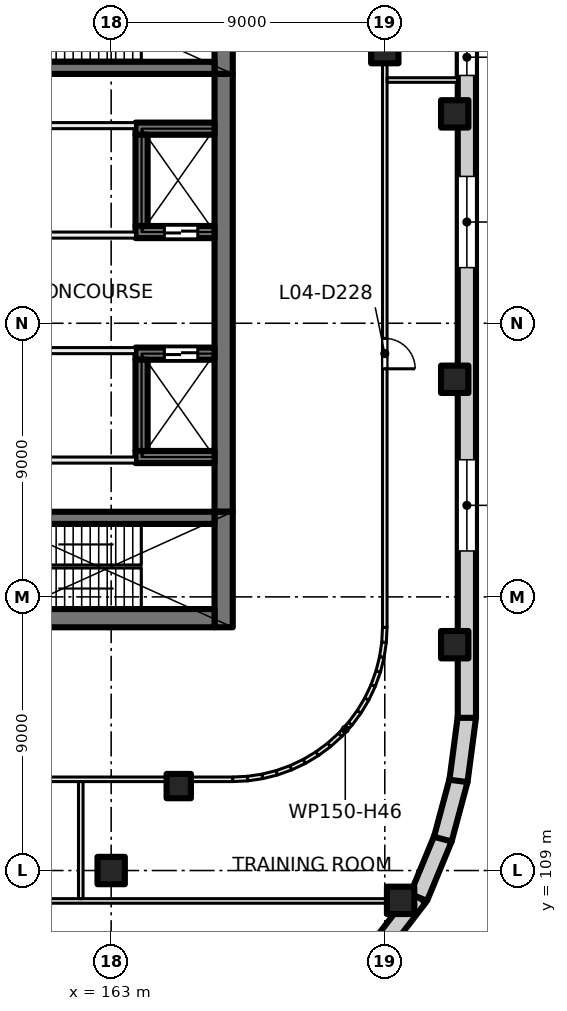
"""IFC4 building model, lengths in metres.
Left out: names, types, materials, properties, quantities, classifications, styles, units other than length and angle.
Written with IfcOpenShell. Run it as: python <this file> out.ifc"""

import sys

from ifc_helpers import new_model, si_unit, direction, frame, frame_2d, origin, origin_2d, place, context, subcontext, project, spatial, rectangle, extrude, element, fill, save


model = new_model("IFC4")
c1 = context("Model", 3, precision=1e-05, world=origin(), true_north=direction((0.0, 1.0)))
c2 = subcontext(c1, "Body", "Model", "MODEL_VIEW")
j1 = project(units=[si_unit("LENGTHUNIT", "METRE"), si_unit("PLANEANGLEUNIT", "RADIAN")], contexts=[c1])
p1 = place(None, origin())
s1 = spatial("IfcSite", under=j1, at=p1, CompositionType="ELEMENT")
p2 = place(p1, origin())
s2 = spatial("IfcBuilding", under=s1, at=p2, CompositionType="ELEMENT")
p3 = place(p2, frame((0.0, 0.0, 22.5)))
s3 = spatial("IfcBuildingStorey", under=s2, at=p3, CompositionType="ELEMENT", Elevation=22.5)
for number, where, z_axis, x_axis in (
    (1, (163.0, 109.0, 0.0), (0.0, 0.0, 1.0), (1.0, 0.0, 0.0)),
    (2, (172.0, 136.0, 0.0), (0.0, 0.0, 1.0), (1.0, 0.0, 0.0)),
    (3, (174.3, 133.887, 0.0), (0.0, 0.0, 1.0), (1.0, 0.0, 0.0)),
    (4, (174.3, 125.157, 0.0), (0.0, 0.0, 1.0), (1.0, 0.0, 0.0)),
    (5, (174.3, 116.427, 0.0), (0.0, 0.0, 1.0), (1.0, 0.0, 0.0)),
    (6, (172.521, 108.019, 0.0), (0.0, 0.0, 1.0), (1.0, 0.0, 0.0)),
):
    element("IfcColumn", number, at=place(p3, frame(where, z_axis=z_axis, x_axis=x_axis)), inside=s3, PredefinedType="COLUMN", context=c2, shape_type="SweptSolid", body=[
        extrude(rectangle(XDim=0.9, YDim=0.9, at=origin_2d()), origin(), (0.0, 0.0, 1.0), 5.0),
    ])
p4 = place(p3, frame((165.223, 111.777, 0.0), z_axis=(0.0, 0.0, 1.0), x_axis=(1.0, 0.0, 0.0)))
e7 = element("IfcColumn", 7, at=p4, inside=s3, PredefinedType="COLUMN", context=c2, shape_type="SweptSolid", body=[
    extrude(rectangle(XDim=0.8, YDim=0.8, at=origin_2d()), origin(), (0.0, 0.0, 1.0), 5.0),
])
p5 = place(p3, frame((166.7, 139.0, 0.0), z_axis=(0.0, 0.0, 1.0), x_axis=(0.0, -1.0, 0.0)))
e8 = element("IfcWall", 8, at=p5, inside=s3, PredefinedType="SHEAR", context=c2, shape_type="SweptSolid", body=[
    extrude(rectangle(XDim=3.8, YDim=0.6, at=frame_2d((1.9, 0.0))), origin(), (0.0, 0.0, 1.0), 5.0),
])
p6 = place(p3, frame((166.7, 135.2, 0.0), z_axis=(0.0, 0.0, 1.0), x_axis=(0.0, -1.0, 0.0)))
e9 = element("IfcWall", 9, at=p6, inside=s3, PredefinedType="SHEAR", context=c2, shape_type="SweptSolid", body=[
    extrude(rectangle(XDim=14.4, YDim=0.6, at=frame_2d((7.2, 0.0))), origin(), (0.0, 0.0, 1.0), 5.0),
])
p7 = place(p3, frame((166.7, 120.8, 0.0), z_axis=(0.0, 0.0, 1.0), x_axis=(0.0, -1.0, 0.0)))
e10 = element("IfcWall", 10, at=p7, inside=s3, PredefinedType="SHEAR", context=c2, shape_type="SweptSolid", body=[
    extrude(rectangle(XDim=3.8, YDim=0.6, at=frame_2d((1.9, 0.0))), origin(), (0.0, 0.0, 1.0), 5.0),
])
p8 = place(p3, frame((166.4, 117.3, 0.0), z_axis=(0.0, 0.0, 1.0), x_axis=(-1.0, 0.0, 0.0)))
e11 = element("IfcWall", 11, at=p8, inside=s3, PredefinedType="SHEAR", context=c2, shape_type="SweptSolid", body=[
    extrude(rectangle(XDim=7.8, YDim=0.6, at=frame_2d((3.9, 0.0))), origin(), (0.0, 0.0, 1.0), 5.0),
])
for number, where, z_axis, x_axis in (
    (12, (166.4, 135.4, 0.0), (0.0, 0.0, 1.0), (-1.0, 0.0, 0.0)),
    (13, (166.4, 120.6, 0.0), (0.0, 0.0, 1.0), (-1.0, 0.0, 0.0)),
):
    element("IfcWall", number, at=place(p3, frame(where, z_axis=z_axis, x_axis=x_axis)), inside=s3, PredefinedType="SHEAR", context=c2, shape_type="SweptSolid", body=[
        extrude(rectangle(XDim=7.8, YDim=0.4, at=frame_2d((3.9, 0.0))), origin(), (0.0, 0.0, 1.0), 5.0),
    ])
p9 = place(p3, frame((166.4, 130.0, 0.0), z_axis=(0.0, 0.0, 1.0), x_axis=(-1.0, 0.0, 0.0)))
e14 = element("IfcWall", 14, at=p9, inside=s3, PredefinedType="SHEAR", context=c2, shape_type="SweptSolid", body=[
    extrude(rectangle(XDim=2.6, YDim=0.4, at=frame_2d((1.3, 0.0))), origin(), (0.0, 0.0, 1.0), 5.0),
])
p10 = place(p9, frame((0.55, 0.0, 0.0)))
e15 = element("IfcOpeningElement", 15, at=p10, cuts=e14, PredefinedType="OPENING", context=c2, shape_type="SweptSolid", body=[
    extrude(rectangle(XDim=1.1, YDim=2.1, at=frame_2d((0.55, 1.05))), frame((0.0, 0.21, 0.0), z_axis=(0.0, -1.0, 0.0), x_axis=(1.0, 0.0, 0.0)), (0.0, 0.0, 1.0), 0.42),
])
p11 = place(p3, frame((166.4, 133.4, 0.0), z_axis=(0.0, 0.0, 1.0), x_axis=(-1.0, 0.0, 0.0)))
e16 = element("IfcWall", 16, at=p11, inside=s3, PredefinedType="SHEAR", context=c2, shape_type="SweptSolid", body=[
    extrude(rectangle(XDim=2.6, YDim=0.4, at=frame_2d((1.3, 0.0))), origin(), (0.0, 0.0, 1.0), 5.0),
])
p12 = place(p3, frame((164.0, 133.2, 0.0), z_axis=(0.0, 0.0, 1.0), x_axis=(0.0, -1.0, 0.0)))
e17 = element("IfcWall", 17, at=p12, inside=s3, PredefinedType="SHEAR", context=c2, shape_type="SweptSolid", body=[
    extrude(rectangle(XDim=3.0, YDim=0.4, at=frame_2d((1.5, 0.0))), origin(), (0.0, 0.0, 1.0), 5.0),
])
p13 = place(p3, frame((166.4, 126.0, 0.0), z_axis=(0.0, 0.0, 1.0), x_axis=(-1.0, 0.0, 0.0)))
e18 = element("IfcWall", 18, at=p13, inside=s3, PredefinedType="SHEAR", context=c2, shape_type="SweptSolid", body=[
    extrude(rectangle(XDim=2.6, YDim=0.4, at=frame_2d((1.3, 0.0))), origin(), (0.0, 0.0, 1.0), 5.0),
])
p14 = place(p13, frame((0.55, 0.0, 0.0)))
e19 = element("IfcOpeningElement", 19, at=p14, cuts=e18, PredefinedType="OPENING", context=c2, shape_type="SweptSolid", body=[
    extrude(rectangle(XDim=1.1, YDim=2.1, at=frame_2d((0.55, 1.05))), frame((0.0, 0.21, 0.0), z_axis=(0.0, -1.0, 0.0), x_axis=(1.0, 0.0, 0.0)), (0.0, 0.0, 1.0), 0.42),
])
p15 = place(p3, frame((166.4, 122.6, 0.0), z_axis=(0.0, 0.0, 1.0), x_axis=(-1.0, 0.0, 0.0)))
e20 = element("IfcWall", 20, at=p15, inside=s3, PredefinedType="SHEAR", context=c2, shape_type="SweptSolid", body=[
    extrude(rectangle(XDim=2.6, YDim=0.4, at=frame_2d((1.3, 0.0))), origin(), (0.0, 0.0, 1.0), 5.0),
])
p16 = place(p3, frame((164.0, 125.8, 0.0), z_axis=(0.0, 0.0, 1.0), x_axis=(0.0, -1.0, 0.0)))
e21 = element("IfcWall", 21, at=p16, inside=s3, PredefinedType="SHEAR", context=c2, shape_type="SweptSolid", body=[
    extrude(rectangle(XDim=3.0, YDim=0.4, at=frame_2d((1.5, 0.0))), origin(), (0.0, 0.0, 1.0), 5.0),
])
p17 = place(p3, frame((173.109, 108.128, 0.0), z_axis=(0.0, 0.0, 1.0), x_axis=(-0.609058260448, -0.793125485267, 0.0)))
e22 = element("IfcWall", 22, at=p17, inside=s3, PredefinedType="SOLIDWALL", context=c2, shape_type="SweptSolid", body=[
    extrude(rectangle(XDim=2.044, YDim=0.6, at=frame_2d((1.022, 0.0))), origin(), (0.0, 0.0, 1.0), 4.625),
])
p18 = place(p3, frame((173.921, 110.069, 0.0), z_axis=(0.0, 0.0, 1.0), x_axis=(-0.382375593358, -0.924006983526, 0.0)))
e23 = element("IfcWall", 23, at=p18, inside=s3, PredefinedType="SOLIDWALL", context=c2, shape_type="SweptSolid", body=[
    extrude(rectangle(XDim=2.114, YDim=0.6, at=frame_2d((1.057, 0.0))), origin(), (0.0, 0.0, 1.0), 4.625),
])
p19 = place(p3, frame((174.432, 111.986, 0.0), z_axis=(0.0, 0.0, 1.0), x_axis=(-0.258804467146, -0.965929732323, 0.0)))
e24 = element("IfcWall", 24, at=p19, inside=s3, PredefinedType="SOLIDWALL", context=c2, shape_type="SweptSolid", body=[
    extrude(rectangle(XDim=2.022, YDim=0.6, at=frame_2d((1.011, 0.0))), origin(), (0.0, 0.0, 1.0), 4.625),
])
p20 = place(p3, frame((174.703, 114.061, 0.0), z_axis=(0.0, 0.0, 1.0), x_axis=(-0.130558200013, -0.991440646942, 0.0)))
e25 = element("IfcWall", 25, at=p20, inside=s3, PredefinedType="SOLIDWALL", context=c2, shape_type="SweptSolid", body=[
    extrude(rectangle(XDim=2.132, YDim=0.6, at=frame_2d((1.066, 0.0))), origin(), (0.0, 0.0, 1.0), 4.625),
])
p21 = place(p3, frame((174.7, 141.978, 0.0), z_axis=(0.0, 0.0, 1.0), x_axis=(0.0, -1.0, 0.0)))
e26 = element("IfcWall", 26, at=p21, inside=s3, PredefinedType="SOLIDWALL", context=c2, shape_type="SweptSolid", body=[
    extrude(rectangle(XDim=27.957, YDim=0.6, at=frame_2d((13.978, 0.0))), origin(), (0.0, 0.0, 1.0), 4.625),
])
p22 = place(p21, frame((0.83, 0.0, 0.9)))
e27 = element("IfcOpeningElement", 27, at=p22, cuts=e26, PredefinedType="OPENING", context=c2, shape_type="SweptSolid", body=[
    extrude(rectangle(XDim=3.0, YDim=3.0, at=frame_2d((1.5, 1.5))), frame((0.0, 0.31, 0.0), z_axis=(0.0, -1.0, 0.0), x_axis=(1.0, 0.0, 0.0)), (0.0, 0.0, 1.0), 0.62),
])
p23 = place(p21, frame((5.628, 0.0, 0.9)))
e28 = element("IfcOpeningElement", 28, at=p23, cuts=e26, PredefinedType="OPENING", context=c2, shape_type="SweptSolid", body=[
    extrude(rectangle(XDim=1.2, YDim=3.0, at=frame_2d((0.6, 1.5))), frame((0.0, 0.31, 0.0), z_axis=(0.0, -1.0, 0.0), x_axis=(1.0, 0.0, 0.0)), (0.0, 0.0, 1.0), 0.62),
])
p24 = place(p21, frame((10.148, 0.0, 0.9)))
e29 = element("IfcOpeningElement", 29, at=p24, cuts=e26, PredefinedType="OPENING", context=c2, shape_type="SweptSolid", body=[
    extrude(rectangle(XDim=3.0, YDim=3.0, at=frame_2d((1.5, 1.5))), frame((0.0, 0.31, 0.0), z_axis=(0.0, -1.0, 0.0), x_axis=(1.0, 0.0, 0.0)), (0.0, 0.0, 1.0), 0.62),
])
p25 = place(p21, frame((19.467, 0.0, 0.9)))
e30 = element("IfcOpeningElement", 30, at=p25, cuts=e26, PredefinedType="OPENING", context=c2, shape_type="SweptSolid", body=[
    extrude(rectangle(XDim=3.0, YDim=3.0, at=frame_2d((1.5, 1.5))), frame((0.0, 0.31, 0.0), z_axis=(0.0, -1.0, 0.0), x_axis=(1.0, 0.0, 0.0)), (0.0, 0.0, 1.0), 0.62),
])
p26 = place(p3, frame((163.8, 126.1, 0.0), z_axis=(0.0, 0.0, 1.0), x_axis=(-1.0, 0.0, 0.0)))
e31 = element("IfcWall", 31, at=p26, inside=s3, PredefinedType="PARTITIONING", context=c2, shape_type="SweptSolid", body=[
    extrude(rectangle(XDim=9.4, YDim=0.2, at=frame_2d((4.7, 0.0))), origin(), (0.0, 0.0, 1.0), 4.625),
])
p27 = place(p26, frame((4.1, 0.0, 0.0)))
e32 = element("IfcOpeningElement", 32, at=p27, cuts=e31, PredefinedType="OPENING", context=c2, shape_type="SweptSolid", body=[
    extrude(rectangle(XDim=1.2, YDim=2.1, at=frame_2d((0.6, 1.05))), frame((0.0, 0.11, 0.0), z_axis=(0.0, -1.0, 0.0), x_axis=(1.0, 0.0, 0.0)), (0.0, 0.0, 1.0), 0.22),
])
p28 = place(p3, frame((163.8, 122.5, 0.0), z_axis=(0.0, 0.0, 1.0), x_axis=(-1.0, 0.0, 0.0)))
e33 = element("IfcWall", 33, at=p28, inside=s3, PredefinedType="PARTITIONING", context=c2, shape_type="SweptSolid", body=[
    extrude(rectangle(XDim=9.4, YDim=0.2, at=frame_2d((4.7, 0.0))), origin(), (0.0, 0.0, 1.0), 4.625),
])
p29 = place(p28, frame((6.55, 0.0, 0.0)))
e34 = element("IfcOpeningElement", 34, at=p29, cuts=e33, PredefinedType="OPENING", context=c2, shape_type="SweptSolid", body=[
    extrude(rectangle(XDim=1.5, YDim=2.1, at=frame_2d((0.75, 1.05))), frame((0.0, 0.11, 0.0), z_axis=(0.0, -1.0, 0.0), x_axis=(1.0, 0.0, 0.0)), (0.0, 0.0, 1.0), 0.22),
])
p30 = place(p3, frame((154.4, 129.9, 0.0), z_axis=(0.0, 0.0, 1.0), x_axis=(1.0, 0.0, 0.0)))
e35 = element("IfcWall", 35, at=p30, inside=s3, PredefinedType="PARTITIONING", context=c2, shape_type="SweptSolid", body=[
    extrude(rectangle(XDim=9.4, YDim=0.2, at=frame_2d((4.7, 0.0))), origin(), (0.0, 0.0, 1.0), 4.625),
])
p31 = place(p30, frame((4.1, 0.0, 0.0)))
e36 = element("IfcOpeningElement", 36, at=p31, cuts=e35, PredefinedType="OPENING", context=c2, shape_type="SweptSolid", body=[
    extrude(rectangle(XDim=1.2, YDim=2.1, at=frame_2d((0.6, 1.05))), frame((0.0, 0.11, 0.0), z_axis=(0.0, -1.0, 0.0), x_axis=(1.0, 0.0, 0.0)), (0.0, 0.0, 1.0), 0.22),
])
p32 = place(p3, frame((154.4, 133.5, 0.0), z_axis=(0.0, 0.0, 1.0), x_axis=(1.0, 0.0, 0.0)))
e37 = element("IfcWall", 37, at=p32, inside=s3, PredefinedType="PARTITIONING", context=c2, shape_type="SweptSolid", body=[
    extrude(rectangle(XDim=9.4, YDim=0.2, at=frame_2d((4.7, 0.0))), origin(), (0.0, 0.0, 1.0), 4.625),
])
p33 = place(p32, frame((1.35, 0.0, 0.0)))
e38 = element("IfcOpeningElement", 38, at=p33, cuts=e37, PredefinedType="OPENING", context=c2, shape_type="SweptSolid", body=[
    extrude(rectangle(XDim=1.5, YDim=2.1, at=frame_2d((0.75, 1.05))), frame((0.0, 0.11, 0.0), z_axis=(0.0, -1.0, 0.0), x_axis=(1.0, 0.0, 0.0)), (0.0, 0.0, 1.0), 0.22),
])
p34 = place(p3, frame((154.075, 108.0, 0.0), z_axis=(0.0, 0.0, 1.0), x_axis=(1.0, 0.0, 0.0)))
e39 = element("IfcWall", 39, at=p34, inside=s3, PredefinedType="PARTITIONING", context=c2, shape_type="SweptSolid", body=[
    extrude(rectangle(XDim=18.557, YDim=0.15, at=frame_2d((9.279, 0.0))), origin(), (0.0, 0.0, 1.0), 4.625),
])
p35 = place(p3, frame((167.002, 112.0, 0.0), z_axis=(0.0, 0.0, 1.0), x_axis=(-1.0, 0.0, 0.0)))
e40 = element("IfcWall", 40, at=p35, inside=s3, PredefinedType="PARTITIONING", context=c2, shape_type="SweptSolid", body=[
    extrude(rectangle(XDim=12.927, YDim=0.15, at=frame_2d((6.463, 0.0))), origin(), (0.0, 0.0, 1.0), 4.625),
])
p36 = place(p35, frame((7.5, 0.0, 0.0)))
e41 = element("IfcOpeningElement", 41, at=p36, cuts=e40, PredefinedType="OPENING", context=c2, shape_type="SweptSolid", body=[
    extrude(rectangle(XDim=1.0, YDim=2.1, at=frame_2d((0.5, 1.05))), frame((0.0, 0.085, 0.0), z_axis=(0.0, -1.0, 0.0), x_axis=(1.0, 0.0, 0.0)), (0.0, 0.0, 1.0), 0.17),
])
p37 = place(p3, frame((162.0, 108.075, 0.0), z_axis=(0.0, 0.0, 1.0), x_axis=(0.0, 1.0, 0.0)))
e42 = element("IfcWall", 42, at=p37, inside=s3, PredefinedType="PARTITIONING", context=c2, shape_type="SweptSolid", body=[
    extrude(rectangle(XDim=3.85, YDim=0.15, at=frame_2d((1.925, 0.0))), origin(), (0.0, 0.0, 1.0), 4.625),
])
p38 = place(p3, frame((166.998, 112.0, 0.0), z_axis=(0.0, 0.0, 1.0), x_axis=(0.998837896651, 0.048196018647, 0.0)))
e43 = element("IfcWall", 43, at=p38, inside=s3, PredefinedType="PARTITIONING", context=c2, shape_type="SweptSolid", body=[
    extrude(rectangle(XDim=0.496, YDim=0.15, at=frame_2d((0.248, 0.0))), origin(), (0.0, 0.0, 1.0), 4.625),
])
p39 = place(p3, frame((167.486, 112.023, 0.0), z_axis=(0.0, 0.0, 1.0), x_axis=(0.988925572052, 0.148412307247, 0.0)))
e44 = element("IfcWall", 44, at=p39, inside=s3, PredefinedType="PARTITIONING", context=c2, shape_type="SweptSolid", body=[
    extrude(rectangle(XDim=0.499, YDim=0.15, at=frame_2d((0.249, 0.0))), origin(), (0.0, 0.0, 1.0), 4.625),
])
p40 = place(p3, frame((167.971, 112.095, 0.0), z_axis=(0.0, 0.0, 1.0), x_axis=(0.970113715952, 0.242650732785, 0.0)))
e45 = element("IfcWall", 45, at=p40, inside=s3, PredefinedType="PARTITIONING", context=c2, shape_type="SweptSolid", body=[
    extrude(rectangle(XDim=0.499, YDim=0.15, at=frame_2d((0.25, 0.0))), origin(), (0.0, 0.0, 1.0), 4.625),
])
for number, where, z_axis, x_axis in (
    (46, (168.447, 112.214, 0.0), (0.0, 0.0, 1.0), (0.941, 0.337, 0.0)),
    (47, (168.91, 112.379, 0.0), (0.0, 0.0, 1.0), (0.904, 0.428, 0.0)),
):
    element("IfcWall", number, at=place(p3, frame(where, z_axis=z_axis, x_axis=x_axis)), inside=s3, PredefinedType="PARTITIONING", context=c2, shape_type="SweptSolid", body=[
        extrude(rectangle(XDim=0.498, YDim=0.15, at=frame_2d((0.249, 0.0))), origin(), (0.0, 0.0, 1.0), 4.625),
    ])
p41 = place(p3, frame((169.354, 112.588, 0.0), z_axis=(0.0, 0.0, 1.0), x_axis=(0.85671397893, 0.515791778052, 0.0)))
e48 = element("IfcWall", 48, at=p41, inside=s3, PredefinedType="PARTITIONING", context=c2, shape_type="SweptSolid", body=[
    extrude(rectangle(XDim=0.499, YDim=0.15, at=frame_2d((0.249, 0.0))), origin(), (0.0, 0.0, 1.0), 4.625),
])
p42 = place(p3, frame((169.775, 112.841, 0.0), z_axis=(0.0, 0.0, 1.0), x_axis=(0.80404358372, 0.594570362092, 0.0)))
e49 = element("IfcWall", 49, at=p42, inside=s3, PredefinedType="PARTITIONING", context=c2, shape_type="SweptSolid", body=[
    extrude(rectangle(XDim=0.498, YDim=0.15, at=frame_2d((0.249, 0.0))), origin(), (0.0, 0.0, 1.0), 4.625),
])
for number, where, z_axis, x_axis in (
    (50, (170.169, 113.133, 0.0), (0.0, 0.0, 1.0), (0.742, 0.67, 0.0)),
    (51, (170.533, 113.461, 0.0), (0.0, 0.0, 1.0), (0.67, 0.742, 0.0)),
):
    element("IfcWall", number, at=place(p3, frame(where, z_axis=z_axis, x_axis=x_axis)), inside=s3, PredefinedType="PARTITIONING", context=c2, shape_type="SweptSolid", body=[
        extrude(rectangle(XDim=0.499, YDim=0.15, at=frame_2d((0.249, 0.0))), origin(), (0.0, 0.0, 1.0), 4.625),
    ])
p43 = place(p3, frame((170.863, 113.825, 0.0), z_axis=(0.0, 0.0, 1.0), x_axis=(0.594570362092, 0.80404358372, 0.0)))
e52 = element("IfcWall", 52, at=p43, inside=s3, PredefinedType="PARTITIONING", context=c2, shape_type="SweptSolid", body=[
    extrude(rectangle(XDim=0.498, YDim=0.15, at=frame_2d((0.249, 0.0))), origin(), (0.0, 0.0, 1.0), 4.625),
])
p44 = place(p3, frame((171.155, 114.219, 0.0), z_axis=(0.0, 0.0, 1.0), x_axis=(0.515791778052, 0.85671397893, 0.0)))
e53 = element("IfcWall", 53, at=p44, inside=s3, PredefinedType="PARTITIONING", context=c2, shape_type="SweptSolid", body=[
    extrude(rectangle(XDim=0.499, YDim=0.15, at=frame_2d((0.249, 0.0))), origin(), (0.0, 0.0, 1.0), 4.625),
])
for number, where, z_axis, x_axis in (
    (54, (171.408, 114.64, 0.0), (0.0, 0.0, 1.0), (0.428, 0.904, 0.0)),
    (55, (171.618, 115.084, 0.0), (0.0, 0.0, 1.0), (0.337, 0.941, 0.0)),
):
    element("IfcWall", number, at=place(p3, frame(where, z_axis=z_axis, x_axis=x_axis)), inside=s3, PredefinedType="PARTITIONING", context=c2, shape_type="SweptSolid", body=[
        extrude(rectangle(XDim=0.498, YDim=0.15, at=frame_2d((0.249, 0.0))), origin(), (0.0, 0.0, 1.0), 4.625),
    ])
p45 = place(p3, frame((171.784, 115.545, 0.0), z_axis=(0.0, 0.0, 1.0), x_axis=(0.242650732785, 0.970113715952, 0.0)))
e56 = element("IfcWall", 56, at=p45, inside=s3, PredefinedType="PARTITIONING", context=c2, shape_type="SweptSolid", body=[
    extrude(rectangle(XDim=0.499, YDim=0.15, at=frame_2d((0.25, 0.0))), origin(), (0.0, 0.0, 1.0), 4.625),
])
p46 = place(p3, frame((171.903, 116.021, 0.0), z_axis=(0.0, 0.0, 1.0), x_axis=(0.148412307247, 0.988925572052, 0.0)))
e57 = element("IfcWall", 57, at=p46, inside=s3, PredefinedType="PARTITIONING", context=c2, shape_type="SweptSolid", body=[
    extrude(rectangle(XDim=0.499, YDim=0.15, at=frame_2d((0.249, 0.0))), origin(), (0.0, 0.0, 1.0), 4.625),
])
p47 = place(p3, frame((171.976, 116.506, 0.0), z_axis=(0.0, 0.0, 1.0), x_axis=(0.048196018647, 0.998837896651, 0.0)))
e58 = element("IfcWall", 58, at=p47, inside=s3, PredefinedType="PARTITIONING", context=c2, shape_type="SweptSolid", body=[
    extrude(rectangle(XDim=0.496, YDim=0.15, at=frame_2d((0.248, 0.0))), origin(), (0.0, 0.0, 1.0), 4.625),
])
p48 = place(p3, frame((172.0, 139.002, 0.0), z_axis=(0.0, 0.0, 1.0), x_axis=(0.0, -1.0, 0.0)))
e59 = element("IfcWall", 59, at=p48, inside=s3, PredefinedType="PARTITIONING", context=c2, shape_type="SweptSolid", body=[
    extrude(rectangle(XDim=22.004, YDim=0.15, at=frame_2d((11.002, 0.0))), origin(), (0.0, 0.0, 1.0), 4.625),
])
p49 = place(p48, frame((12.5, 0.0, 0.0)))
e60 = element("IfcOpeningElement", 60, at=p49, cuts=e59, PredefinedType="OPENING", context=c2, shape_type="SweptSolid", body=[
    extrude(rectangle(XDim=1.0, YDim=2.1, at=frame_2d((0.5, 1.05))), frame((0.0, 0.085, 0.0), z_axis=(0.0, -1.0, 0.0), x_axis=(1.0, 0.0, 0.0)), (0.0, 0.0, 1.0), 0.17),
])
p50 = place(p3, frame((172.075, 135.0, 0.0), z_axis=(0.0, 0.0, 1.0), x_axis=(1.0, 0.0, 0.0)))
e61 = element("IfcWall", 61, at=p50, inside=s3, PredefinedType="PARTITIONING", context=c2, shape_type="SweptSolid", body=[
    extrude(rectangle(XDim=2.325, YDim=0.15, at=frame_2d((1.163, 0.0))), origin(), (0.0, 0.0, 1.0), 4.625),
])
p51 = place(p23, origin())
e62 = element("IfcWindow", 62, at=p51, inside=s3, PartitioningType="SINGLE_PANEL", PredefinedType="WINDOW", context=c2, shape_type="SweptSolid", body=[
    extrude(rectangle(XDim=1.2, YDim=3.0, at=frame_2d((0.6, 1.5))), frame((0.0, 0.03, 0.0), z_axis=(0.0, -1.0, 0.0), x_axis=(1.0, 0.0, 0.0)), (0.0, 0.0, 1.0), 0.06),
])
fill(e28, e62)
p52 = place(p24, origin())
e63 = element("IfcWindow", 63, at=p52, inside=s3, PartitioningType="SINGLE_PANEL", PredefinedType="WINDOW", context=c2, shape_type="SweptSolid", body=[
    extrude(rectangle(XDim=3.0, YDim=3.0, at=frame_2d((1.5, 1.5))), frame((0.0, 0.03, 0.0), z_axis=(0.0, -1.0, 0.0), x_axis=(1.0, 0.0, 0.0)), (0.0, 0.0, 1.0), 0.06),
])
fill(e29, e63)
p53 = place(p25, origin())
e64 = element("IfcWindow", 64, at=p53, inside=s3, PartitioningType="SINGLE_PANEL", PredefinedType="WINDOW", context=c2, shape_type="SweptSolid", body=[
    extrude(rectangle(XDim=3.0, YDim=3.0, at=frame_2d((1.5, 1.5))), frame((0.0, 0.03, 0.0), z_axis=(0.0, -1.0, 0.0), x_axis=(1.0, 0.0, 0.0)), (0.0, 0.0, 1.0), 0.06),
])
fill(e30, e64)
p54 = place(p14, origin())
e65 = element("IfcDoor", 65, at=p54, inside=s3, OperationType="DOUBLE_DOOR_SLIDING", PredefinedType="DOOR", context=c2, shape_type="SweptSolid", body=[
    extrude(rectangle(XDim=1.1, YDim=2.1, at=frame_2d((0.55, 1.05))), frame((0.0, 0.025, 0.0), z_axis=(0.0, -1.0, 0.0), x_axis=(1.0, 0.0, 0.0)), (0.0, 0.0, 1.0), 0.05),
])
fill(e19, e65)
p55 = place(p10, origin())
e66 = element("IfcDoor", 66, at=p55, inside=s3, OperationType="DOUBLE_DOOR_SLIDING", PredefinedType="DOOR", context=c2, shape_type="SweptSolid", body=[
    extrude(rectangle(XDim=1.1, YDim=2.1, at=frame_2d((0.55, 1.05))), frame((0.0, 0.025, 0.0), z_axis=(0.0, -1.0, 0.0), x_axis=(1.0, 0.0, 0.0)), (0.0, 0.0, 1.0), 0.05),
])
fill(e15, e66)
p56 = place(p49, origin())
e67 = element("IfcDoor", 67, at=p56, inside=s3, OperationType="SINGLE_SWING_RIGHT", PredefinedType="DOOR", context=c2, shape_type="SweptSolid", body=[
    extrude(rectangle(XDim=1.0, YDim=2.1, at=frame_2d((0.5, 1.05))), frame((0.0, 0.025, 0.0), z_axis=(0.0, -1.0, 0.0), x_axis=(1.0, 0.0, 0.0)), (0.0, 0.0, 1.0), 0.05),
])
fill(e60, e67)
save(model, sys.argv[1])
